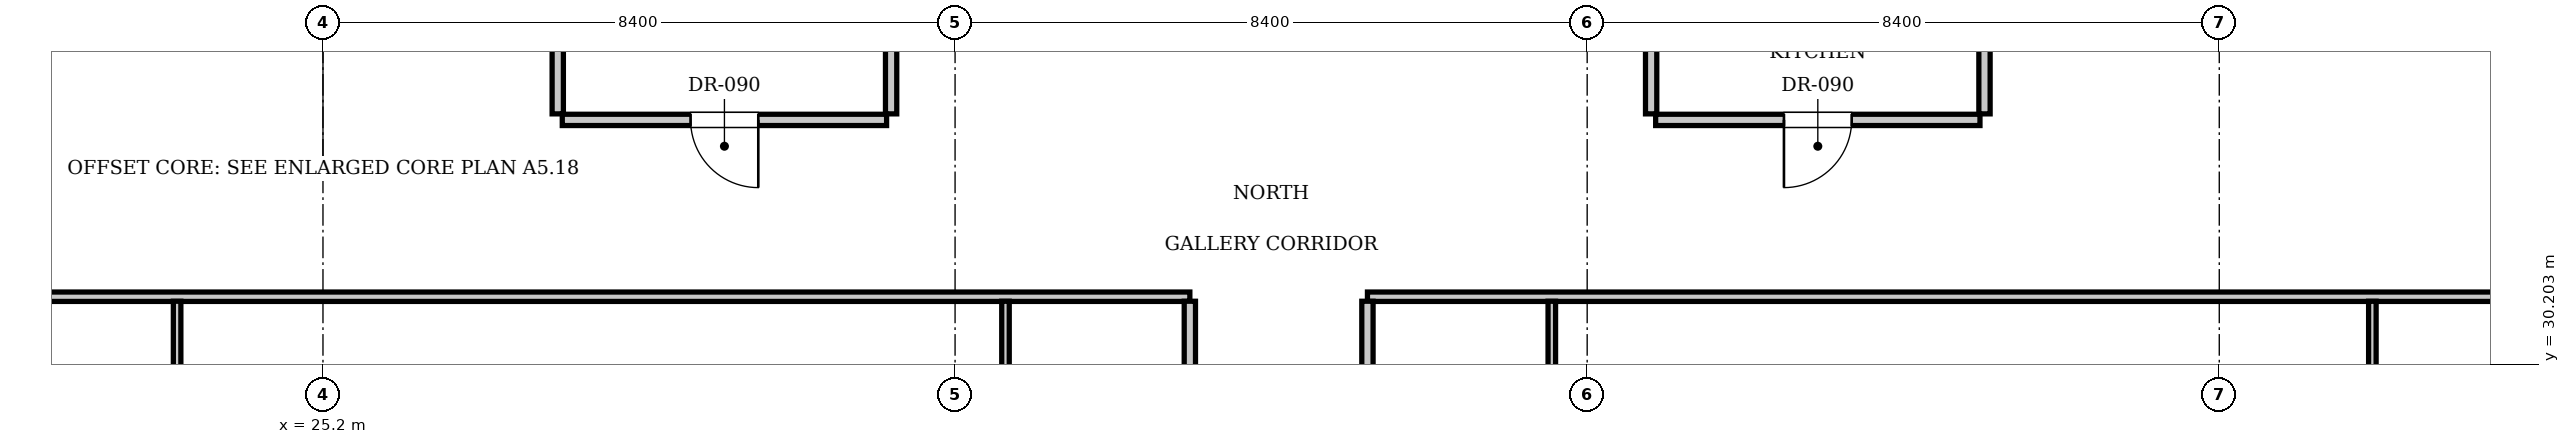
"""IFC4 building model, lengths in metres.
Left out: names, types, materials, properties, quantities, classifications, styles, units other than length and angle.
Written with IfcOpenShell. Run it as: python <this file> out.ifc"""

import sys

from ifc_helpers import new_model, si_unit, direction, frame, frame_2d, origin, place, context, subcontext, project, spatial, rectangle, extrude, element, fill, save


model = new_model("IFC4")
c1 = context("Model", 3, precision=1e-05, world=origin(), true_north=direction((0.0, 1.0)))
c2 = subcontext(c1, "Body", "Model", "MODEL_VIEW")
j1 = project(units=[si_unit("LENGTHUNIT", "METRE"), si_unit("PLANEANGLEUNIT", "RADIAN")], contexts=[c1])
p1 = place(None, origin())
s1 = spatial("IfcSite", under=j1, at=p1, CompositionType="ELEMENT")
p2 = place(p1, origin())
s2 = spatial("IfcBuilding", under=s1, at=p2, CompositionType="ELEMENT")
p3 = place(p2, frame((0.0, 0.0, 212.1)))
s3 = spatial("IfcBuildingStorey", under=s2, at=p3, CompositionType="ELEMENT", Elevation=212.1)
for number, where, z_axis, x_axis in (
    (1, (28.32, 33.53, 0.0), (0.0, 0.0, 1.0), (0.0, 1.0, 0.0)),
    (2, (32.75, 33.53, 0.0), (0.0, 0.0, 1.0), (0.0, 1.0, 0.0)),
):
    element("IfcWall", number, at=place(p3, frame(where, z_axis=z_axis, x_axis=x_axis)), inside=s3, PredefinedType="PARTITIONING", context=c2, shape_type="SweptSolid", body=[
        extrude(rectangle(XDim=2.59, YDim=0.15, at=frame_2d((1.295, 0.0))), origin(), (0.0, 0.0, 1.0), 3.61),
    ])
p4 = place(p3, frame((28.38, 33.45, 0.0), z_axis=(0.0, 0.0, 1.0), x_axis=(1.0, 0.0, 0.0)))
e3 = element("IfcWall", 3, at=p4, inside=s3, PredefinedType="PARTITIONING", context=c2, shape_type="SweptSolid", body=[
    extrude(rectangle(XDim=4.31, YDim=0.15, at=frame_2d((2.155, 0.0))), origin(), (0.0, 0.0, 1.0), 3.61),
])
p5 = place(p4, frame((1.705, 0.0, 0.0)))
e4 = element("IfcOpeningElement", 4, at=p5, cuts=e3, PredefinedType="OPENING", context=c2, shape_type="SweptSolid", body=[
    extrude(rectangle(XDim=0.9, YDim=2.1, at=frame_2d((0.45, 1.05))), frame((0.0, 0.085, 0.0), z_axis=(0.0, -1.0, 0.0), x_axis=(1.0, 0.0, 0.0)), (0.0, 0.0, 1.0), 0.17),
])
for number, where, z_axis, x_axis in (
    (5, (42.85, 33.53, 0.0), (0.0, 0.0, 1.0), (0.0, 1.0, 0.0)),
    (6, (47.28, 33.53, 0.0), (0.0, 0.0, 1.0), (0.0, 1.0, 0.0)),
):
    element("IfcWall", number, at=place(p3, frame(where, z_axis=z_axis, x_axis=x_axis)), inside=s3, PredefinedType="PARTITIONING", context=c2, shape_type="SweptSolid", body=[
        extrude(rectangle(XDim=2.59, YDim=0.15, at=frame_2d((1.295, 0.0))), origin(), (0.0, 0.0, 1.0), 3.61),
    ])
p6 = place(p3, frame((42.91, 33.45, 0.0), z_axis=(0.0, 0.0, 1.0), x_axis=(1.0, 0.0, 0.0)))
e7 = element("IfcWall", 7, at=p6, inside=s3, PredefinedType="PARTITIONING", context=c2, shape_type="SweptSolid", body=[
    extrude(rectangle(XDim=4.31, YDim=0.15, at=frame_2d((2.155, 0.0))), origin(), (0.0, 0.0, 1.0), 3.61),
])
p7 = place(p6, frame((1.705, 0.0, 0.0)))
e8 = element("IfcOpeningElement", 8, at=p7, cuts=e7, PredefinedType="OPENING", context=c2, shape_type="SweptSolid", body=[
    extrude(rectangle(XDim=0.9, YDim=2.1, at=frame_2d((0.45, 1.05))), frame((0.0, 0.085, 0.0), z_axis=(0.0, -1.0, 0.0), x_axis=(1.0, 0.0, 0.0)), (0.0, 0.0, 1.0), 0.17),
])
p8 = place(p3, frame((13.2, 31.1, 0.0), z_axis=(0.0, 0.0, 1.0), x_axis=(1.0, 0.0, 0.0)))
e9 = element("IfcWall", 9, at=p8, inside=s3, PredefinedType="PARTITIONING", context=c2, shape_type="SweptSolid", body=[
    extrude(rectangle(XDim=23.52, YDim=0.125, at=frame_2d((11.76, 0.0))), origin(), (0.0, 0.0, 1.0), 3.61),
])
p9 = place(p3, frame((39.08, 31.1, 0.0), z_axis=(0.0, 0.0, 1.0), x_axis=(1.0, 0.0, 0.0)))
e10 = element("IfcWall", 10, at=p9, inside=s3, PredefinedType="PARTITIONING", context=c2, shape_type="SweptSolid", body=[
    extrude(rectangle(XDim=23.32, YDim=0.125, at=frame_2d((11.66, 0.0))), origin(), (0.0, 0.0, 1.0), 3.61),
])
p10 = place(p3, frame((36.72, 29.15, 0.0), z_axis=(0.0, 0.0, 1.0), x_axis=(0.0, 1.0, 0.0)))
e11 = element("IfcWall", 11, at=p10, inside=s3, PredefinedType="PARTITIONING", context=c2, shape_type="SweptSolid", body=[
    extrude(rectangle(XDim=1.89, YDim=0.15, at=frame_2d((0.945, 0.0))), origin(), (0.0, 0.0, 1.0), 3.61),
])
p11 = place(p3, frame((34.27, 29.15, 0.0), z_axis=(0.0, 0.0, 1.0), x_axis=(0.0, 1.0, 0.0)))
e12 = element("IfcWall", 12, at=p11, inside=s3, PredefinedType="PARTITIONING", context=c2, shape_type="SweptSolid", body=[
    extrude(rectangle(XDim=1.89, YDim=0.1, at=frame_2d((0.945, 0.0))), origin(), (0.0, 0.0, 1.0), 3.61),
])
p12 = place(p3, frame((23.262, 26.76, 0.0), z_axis=(0.0, 0.0, 1.0), x_axis=(0.0, 1.0, 0.0)))
e13 = element("IfcWall", 13, at=p12, inside=s3, PredefinedType="PARTITIONING", context=c2, shape_type="SweptSolid", body=[
    extrude(rectangle(XDim=4.28, YDim=0.1, at=frame_2d((2.14, 0.0))), origin(), (0.0, 0.0, 1.0), 3.61),
])
p13 = place(p12, frame((1.69, 0.0, 0.0)))
e14 = element("IfcOpeningElement", 14, at=p13, cuts=e13, PredefinedType="OPENING", context=c2, shape_type="SweptSolid", body=[
    extrude(rectangle(XDim=0.9, YDim=2.1, at=frame_2d((0.45, 1.05))), frame((0.0, 0.06, 0.0), z_axis=(0.0, -1.0, 0.0), x_axis=(1.0, 0.0, 0.0)), (0.0, 0.0, 1.0), 0.12),
])
p14 = place(p3, frame((39.08, 29.15, 0.0), z_axis=(0.0, 0.0, 1.0), x_axis=(0.0, 1.0, 0.0)))
e15 = element("IfcWall", 15, at=p14, inside=s3, PredefinedType="PARTITIONING", context=c2, shape_type="SweptSolid", body=[
    extrude(rectangle(XDim=1.89, YDim=0.15, at=frame_2d((0.945, 0.0))), origin(), (0.0, 0.0, 1.0), 3.61),
])
p15 = place(p3, frame((41.53, 29.15, 0.0), z_axis=(0.0, 0.0, 1.0), x_axis=(0.0, 1.0, 0.0)))
e16 = element("IfcWall", 16, at=p15, inside=s3, PredefinedType="PARTITIONING", context=c2, shape_type="SweptSolid", body=[
    extrude(rectangle(XDim=1.89, YDim=0.1, at=frame_2d((0.945, 0.0))), origin(), (0.0, 0.0, 1.0), 3.61),
])
p16 = place(p3, frame((52.434, 26.76, 0.0), z_axis=(0.0, 0.0, 1.0), x_axis=(0.0, 1.0, 0.0)))
e17 = element("IfcWall", 17, at=p16, inside=s3, PredefinedType="PARTITIONING", context=c2, shape_type="SweptSolid", body=[
    extrude(rectangle(XDim=4.28, YDim=0.1, at=frame_2d((2.14, 0.0))), origin(), (0.0, 0.0, 1.0), 3.61),
])
p17 = place(p16, frame((1.69, 0.0, 0.0)))
e18 = element("IfcOpeningElement", 18, at=p17, cuts=e17, PredefinedType="OPENING", context=c2, shape_type="SweptSolid", body=[
    extrude(rectangle(XDim=0.9, YDim=2.1, at=frame_2d((0.45, 1.05))), frame((0.0, 0.06, 0.0), z_axis=(0.0, -1.0, 0.0), x_axis=(1.0, 0.0, 0.0)), (0.0, 0.0, 1.0), 0.12),
])
p18 = place(p5, frame((0.9, 0.0, 0.0), z_axis=(0.0, 0.0, 1.0), x_axis=(-1.0, 0.0, 0.0)))
e19 = element("IfcDoor", 19, at=p18, inside=s3, OperationType="SINGLE_SWING_LEFT", PredefinedType="DOOR", context=c2, shape_type="SweptSolid", body=[
    extrude(rectangle(XDim=0.9, YDim=2.1, at=frame_2d((0.45, 1.05))), frame((0.0, 0.025, 0.0), z_axis=(0.0, -1.0, 0.0), x_axis=(1.0, 0.0, 0.0)), (0.0, 0.0, 1.0), 0.05),
])
fill(e4, e19)
p19 = place(p7, frame((0.9, 0.0, 0.0), z_axis=(0.0, 0.0, 1.0), x_axis=(-1.0, 0.0, 0.0)))
e20 = element("IfcDoor", 20, at=p19, inside=s3, OperationType="SINGLE_SWING_RIGHT", PredefinedType="DOOR", context=c2, shape_type="SweptSolid", body=[
    extrude(rectangle(XDim=0.9, YDim=2.1, at=frame_2d((0.45, 1.05))), frame((0.0, 0.025, 0.0), z_axis=(0.0, -1.0, 0.0), x_axis=(1.0, 0.0, 0.0)), (0.0, 0.0, 1.0), 0.05),
])
fill(e8, e20)
save(model, sys.argv[1])
